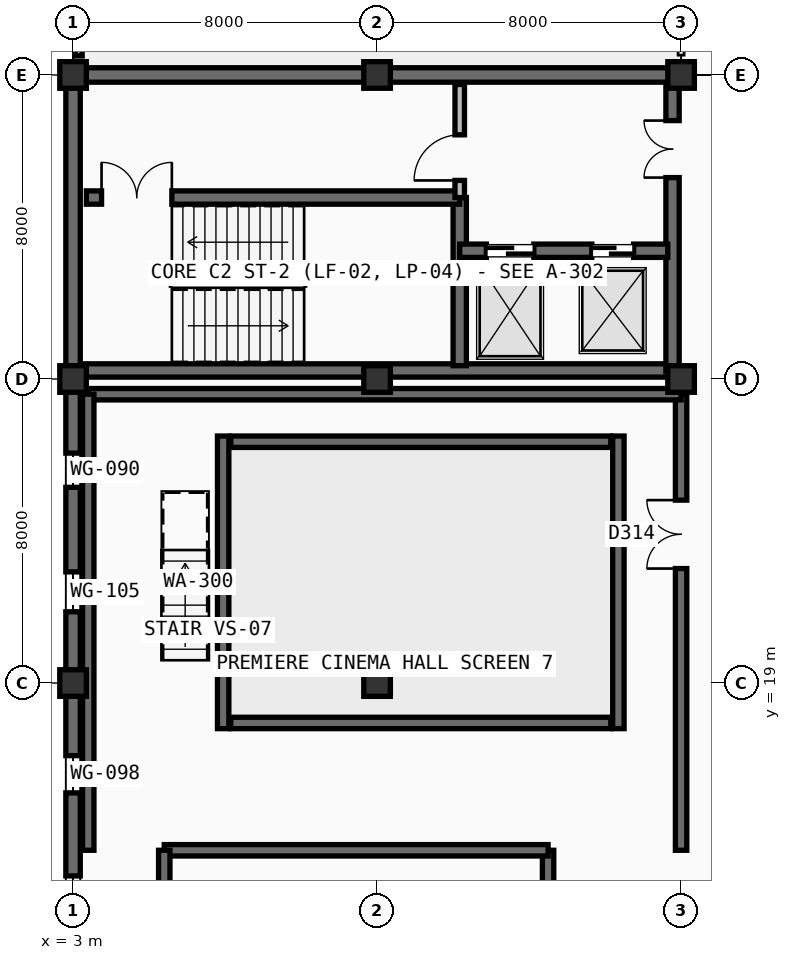
"""IFC4 building model, lengths in metres.
Left out: names, types, materials, properties, quantities, classifications, styles, units other than length and angle.
Written with IfcOpenShell. Run it as: python <this file> out.ifc"""

import sys

from ifc_helpers import new_model, si_unit, direction, frame, frame_2d, origin, origin_2d, place, context, subcontext, project, spatial, polyline, rectangle, outline, extrude, element, fill, save


model = new_model("IFC4")
c1 = context("Model", 3, precision=1e-05, world=origin(), true_north=direction((0.0, 1.0)))
c2 = subcontext(c1, "Body", "Model", "MODEL_VIEW")
j1 = project(units=[si_unit("LENGTHUNIT", "METRE"), si_unit("PLANEANGLEUNIT", "RADIAN")], contexts=[c1])
p1 = place(None, origin())
s1 = spatial("IfcSite", under=j1, at=p1, CompositionType="ELEMENT")
p2 = place(p1, origin())
s2 = spatial("IfcBuilding", under=s1, at=p2, CompositionType="ELEMENT")
p3 = place(p2, frame((0.0, 0.0, 23.4)))
s3 = spatial("IfcBuildingStorey", under=s2, at=p3, CompositionType="ELEMENT", Elevation=23.4)
for number, where, z_axis, x_axis in (
    (1, (3.0, 19.0, 0.0), (0.0, 0.0, 1.0), (1.0, 0.0, 0.0)),
    (2, (3.0, 27.0, 0.0), (0.0, 0.0, 1.0), (1.0, 0.0, 0.0)),
    (3, (3.0, 35.0, 0.0), (0.0, 0.0, 1.0), (1.0, 0.0, 0.0)),
    (4, (11.0, 19.0, 0.0), (0.0, 0.0, 1.0), (1.0, 0.0, 0.0)),
    (5, (11.0, 27.0, 0.0), (0.0, 0.0, 1.0), (1.0, 0.0, 0.0)),
    (6, (11.0, 35.0, 0.0), (0.0, 0.0, 1.0), (1.0, 0.0, 0.0)),
    (7, (19.0, 27.0, 0.0), (0.0, 0.0, 1.0), (1.0, 0.0, 0.0)),
    (8, (19.0, 35.0, 0.0), (0.0, 0.0, 1.0), (1.0, 0.0, 0.0)),
):
    element("IfcColumn", number, at=place(p3, frame(where, z_axis=z_axis, x_axis=x_axis)), inside=s3, PredefinedType="COLUMN", context=c2, shape_type="SweptSolid", body=[
        extrude(rectangle(XDim=0.7, YDim=0.7, at=origin_2d()), origin(), (0.0, 0.0, 1.0), 4.5),
    ])
for number, where, z_axis, x_axis in (
    (9, (6.95, 17.8, 0.0), (0.0, 0.0, 1.0), (0.0, 1.0, 0.0)),
    (10, (17.35, 17.8, 0.0), (0.0, 0.0, 1.0), (0.0, 1.0, 0.0)),
):
    element("IfcWall", number, at=place(p3, frame(where, z_axis=z_axis, x_axis=x_axis)), inside=s3, PredefinedType="SHEAR", context=c2, shape_type="SweptSolid", body=[
        extrude(outline(polyline([(0.0, 0.0), (7.7, 0.0), (7.7, 2.27), (0.0, 0.32), (0.0, 0.0)])), frame((0.0, 0.15, 0.0), z_axis=(0.0, -1.0, 0.0), x_axis=(1.0, 0.0, 0.0)), (0.0, 0.0, 1.0), 0.3),
    ])
p4 = place(p3, frame((7.15, 25.35, 0.0), z_axis=(0.0, 0.0, 1.0), x_axis=(1.0, 0.0, 0.0)))
e11 = element("IfcWall", 11, at=p4, inside=s3, PredefinedType="SHEAR", context=c2, shape_type="SweptSolid", body=[
    extrude(rectangle(XDim=10.0, YDim=0.3, at=frame_2d((5.0, 0.0))), origin(), (0.0, 0.0, 1.0), 2.27),
])
p5 = place(p3, frame((7.15, 17.95, 0.0), z_axis=(0.0, 0.0, 1.0), x_axis=(1.0, 0.0, 0.0)))
e12 = element("IfcWall", 12, at=p5, inside=s3, PredefinedType="SHEAR", context=c2, shape_type="SweptSolid", body=[
    extrude(rectangle(XDim=10.0, YDim=0.3, at=frame_2d((5.0, 0.0))), origin(), (0.0, 0.0, 1.0), 0.32),
])
p6 = place(p3, frame((3.0, 11.0, 0.0), z_axis=(0.0, 0.0, 1.0), x_axis=(0.0, 1.0, 0.0)))
e13 = element("IfcWall", 13, at=p6, inside=s3, PredefinedType="SOLIDWALL", context=c2, shape_type="SweptSolid", body=[
    extrude(rectangle(XDim=8.0, YDim=0.38, at=frame_2d((4.0, 0.0))), origin(), (0.0, 0.0, 1.0), 4.5),
])
p7 = place(p6, frame((1.875, 0.0, 1.05)))
e14 = element("IfcOpeningElement", 14, at=p7, cuts=e13, PredefinedType="OPENING", context=c2, shape_type="SweptSolid", body=[
    extrude(rectangle(XDim=1.05, YDim=1.7, at=frame_2d((0.525, 0.85))), frame((0.0, 0.2, 0.0), z_axis=(0.0, -1.0, 0.0), x_axis=(1.0, 0.0, 0.0)), (0.0, 0.0, 1.0), 0.4),
])
p8 = place(p6, frame((5.11, 0.0, 1.05)))
e15 = element("IfcOpeningElement", 15, at=p8, cuts=e13, PredefinedType="OPENING", context=c2, shape_type="SweptSolid", body=[
    extrude(rectangle(XDim=0.98, YDim=1.6, at=frame_2d((0.49, 0.8))), frame((0.0, 0.2, 0.0), z_axis=(0.0, -1.0, 0.0), x_axis=(1.0, 0.0, 0.0)), (0.0, 0.0, 1.0), 0.4),
])
p9 = place(p3, frame((3.0, 19.0, 0.0), z_axis=(0.0, 0.0, 1.0), x_axis=(0.0, 1.0, 0.0)))
e16 = element("IfcWall", 16, at=p9, inside=s3, PredefinedType="SOLIDWALL", context=c2, shape_type="SweptSolid", body=[
    extrude(rectangle(XDim=8.0, YDim=0.38, at=frame_2d((4.0, 0.0))), origin(), (0.0, 0.0, 1.0), 4.5),
])
p10 = place(p9, frame((1.875, 0.0, 1.05)))
e17 = element("IfcOpeningElement", 17, at=p10, cuts=e16, PredefinedType="OPENING", context=c2, shape_type="SweptSolid", body=[
    extrude(rectangle(XDim=1.05, YDim=1.7, at=frame_2d((0.525, 0.85))), frame((0.0, 0.2, 0.0), z_axis=(0.0, -1.0, 0.0), x_axis=(1.0, 0.0, 0.0)), (0.0, 0.0, 1.0), 0.4),
])
p11 = place(p9, frame((5.15, 0.0, 1.05)))
e18 = element("IfcOpeningElement", 18, at=p11, cuts=e16, PredefinedType="OPENING", context=c2, shape_type="SweptSolid", body=[
    extrude(rectangle(XDim=0.9, YDim=1.5, at=frame_2d((0.45, 0.75))), frame((0.0, 0.2, 0.0), z_axis=(0.0, -1.0, 0.0), x_axis=(1.0, 0.0, 0.0)), (0.0, 0.0, 1.0), 0.4),
])
for number, where, z_axis, x_axis in (
    (19, (3.0, 27.0, 0.0), (0.0, 0.0, 1.0), (0.0, 1.0, 0.0)),
    (20, (3.0, 35.0, 0.0), (0.0, 0.0, 1.0), (1.0, 0.0, 0.0)),
    (21, (11.0, 35.0, 0.0), (0.0, 0.0, 1.0), (1.0, 0.0, 0.0)),
):
    element("IfcWall", number, at=place(p3, frame(where, z_axis=z_axis, x_axis=x_axis)), inside=s3, PredefinedType="SOLIDWALL", context=c2, shape_type="SweptSolid", body=[
        extrude(rectangle(XDim=8.0, YDim=0.38, at=frame_2d((4.0, 0.0))), origin(), (0.0, 0.0, 1.0), 4.5),
    ])
p12 = place(p3, frame((3.15, 35.5, 0.0), z_axis=(0.0, 0.0, 1.0), x_axis=(0.0, 1.0, 0.0)))
e22 = element("IfcWall", 22, at=p12, inside=s3, PredefinedType="PARAPET", context=c2, shape_type="SweptSolid", body=[
    extrude(rectangle(XDim=36.35, YDim=0.18, at=frame_2d((18.175, 0.0))), origin(), (0.0, 0.0, 1.0), 1.15),
])
p13 = place(p3, frame((3.2, 27.225, 0.0), z_axis=(0.0, 0.0, 1.0), x_axis=(1.0, 0.0, 0.0)))
e23 = element("IfcWall", 23, at=p13, inside=s3, PredefinedType="SHEAR", context=c2, shape_type="SweptSolid", body=[
    extrude(rectangle(XDim=15.6, YDim=0.35, at=frame_2d((7.8, 0.0))), origin(), (0.0, 0.0, 1.0), 4.1),
])
p14 = place(p3, frame((13.175, 27.35, 0.0), z_axis=(0.0, 0.0, 1.0), x_axis=(0.0, 1.0, 0.0)))
e24 = element("IfcWall", 24, at=p14, inside=s3, PredefinedType="SHEAR", context=c2, shape_type="SweptSolid", body=[
    extrude(rectangle(XDim=4.425, YDim=0.35, at=frame_2d((2.212, 0.0))), origin(), (0.0, 0.0, 1.0), 4.1),
])
p15 = place(p3, frame((18.775, 27.2, 0.0), z_axis=(0.0, 0.0, 1.0), x_axis=(0.0, 1.0, 0.0)))
e25 = element("IfcWall", 25, at=p15, inside=s3, PredefinedType="SHEAR", context=c2, shape_type="SweptSolid", body=[
    extrude(rectangle(XDim=7.6, YDim=0.35, at=frame_2d((3.8, 0.0))), origin(), (0.0, 0.0, 1.0), 4.1),
])
p16 = place(p15, frame((5.1, 0.0, 0.0)))
e26 = element("IfcOpeningElement", 26, at=p16, cuts=e25, PredefinedType="OPENING", context=c2, shape_type="SweptSolid", body=[
    extrude(rectangle(XDim=1.5, YDim=2.2, at=frame_2d((0.75, 1.1))), frame((0.0, 0.185, 0.0), z_axis=(0.0, -1.0, 0.0), x_axis=(1.0, 0.0, 0.0)), (0.0, 0.0, 1.0), 0.37),
])
p17 = place(p3, frame((3.35, 31.775, 0.0), z_axis=(0.0, 0.0, 1.0), x_axis=(1.0, 0.0, 0.0)))
e27 = element("IfcWall", 27, at=p17, inside=s3, PredefinedType="SHEAR", context=c2, shape_type="SweptSolid", body=[
    extrude(rectangle(XDim=9.825, YDim=0.35, at=frame_2d((4.913, 0.0))), origin(), (0.0, 0.0, 1.0), 4.1),
])
p18 = place(p17, frame((0.4, 0.0, 0.0)))
e28 = element("IfcOpeningElement", 28, at=p18, cuts=e27, PredefinedType="OPENING", context=c2, shape_type="SweptSolid", body=[
    extrude(rectangle(XDim=1.85, YDim=2.25, at=frame_2d((0.925, 1.125))), frame((0.0, 0.185, 0.0), z_axis=(0.0, -1.0, 0.0), x_axis=(1.0, 0.0, 0.0)), (0.0, 0.0, 1.0), 0.37),
])
p19 = place(p3, frame((13.175, 30.375, 0.0), z_axis=(0.0, 0.0, 1.0), x_axis=(1.0, 0.0, 0.0)))
e29 = element("IfcWall", 29, at=p19, inside=s3, PredefinedType="SHEAR", context=c2, shape_type="SweptSolid", body=[
    extrude(rectangle(XDim=5.475, YDim=0.35, at=frame_2d((2.737, 0.0))), origin(), (0.0, 0.0, 1.0), 4.1),
])
p20 = place(p19, frame((0.7, 0.0, 0.0)))
e30 = element("IfcOpeningElement", 30, at=p20, cuts=e29, PredefinedType="OPENING", context=c2, shape_type="SweptSolid", body=[
    extrude(rectangle(XDim=1.25, YDim=2.25, at=frame_2d((0.625, 1.125))), frame((0.0, 0.185, 0.0), z_axis=(0.0, -1.0, 0.0), x_axis=(1.0, 0.0, 0.0)), (0.0, 0.0, 1.0), 0.37),
])
p21 = place(p19, frame((3.475, 0.0, 0.0)))
e31 = element("IfcOpeningElement", 31, at=p21, cuts=e29, PredefinedType="OPENING", context=c2, shape_type="SweptSolid", body=[
    extrude(rectangle(XDim=1.1, YDim=2.2, at=frame_2d((0.55, 1.1))), frame((0.0, 0.185, 0.0), z_axis=(0.0, -1.0, 0.0), x_axis=(1.0, 0.0, 0.0)), (0.0, 0.0, 1.0), 0.37),
])
p22 = place(p3, frame((13.175, 31.775, 0.0), z_axis=(0.0, 0.0, 1.0), x_axis=(0.0, 1.0, 0.0)))
e32 = element("IfcWall", 32, at=p22, inside=s3, PredefinedType="PARTITIONING", context=c2, shape_type="SweptSolid", body=[
    extrude(rectangle(XDim=2.975, YDim=0.25, at=frame_2d((1.488, 0.0))), origin(), (0.0, 0.0, 1.0), 4.1),
])
p23 = place(p22, frame((0.45, 0.0, 0.0)))
e33 = element("IfcOpeningElement", 33, at=p23, cuts=e32, PredefinedType="OPENING", context=c2, shape_type="SweptSolid", body=[
    extrude(rectangle(XDim=1.2, YDim=2.2, at=frame_2d((0.6, 1.1))), frame((0.0, 0.135, 0.0), z_axis=(0.0, -1.0, 0.0), x_axis=(1.0, 0.0, 0.0)), (0.0, 0.0, 1.0), 0.27),
])
p24 = place(p3, frame((15.5, 3.4, 0.0), z_axis=(0.0, 0.0, 1.0), x_axis=(0.0, 1.0, 0.0)))
e34 = element("IfcWall", 34, at=p24, inside=s3, PredefinedType="SHEAR", context=c2, shape_type="SweptSolid", body=[
    extrude(rectangle(XDim=11.2, YDim=0.3, at=frame_2d((5.6, 0.0))), origin(), (0.0, 0.0, 1.0), 4.1),
])
p25 = place(p24, frame((2.814, 0.0, 0.0)))
e35 = element("IfcOpeningElement", 35, at=p25, cuts=e34, PredefinedType="OPENING", context=c2, shape_type="SweptSolid", body=[
    extrude(rectangle(XDim=1.5, YDim=2.2, at=frame_2d((0.75, 1.1))), frame((0.0, 0.16, 0.0), z_axis=(0.0, -1.0, 0.0), x_axis=(1.0, 0.0, 0.0)), (0.0, 0.0, 1.0), 0.32),
])
p26 = place(p3, frame((5.4, 14.6, 0.0), z_axis=(0.0, 0.0, 1.0), x_axis=(1.0, 0.0, 0.0)))
e36 = element("IfcWall", 36, at=p26, inside=s3, PredefinedType="SHEAR", context=c2, shape_type="SweptSolid", body=[
    extrude(rectangle(XDim=10.1, YDim=0.3, at=frame_2d((5.05, 0.0))), origin(), (0.0, 0.0, 1.0), 4.1),
])
p27 = place(p3, frame((5.4, 3.4, 0.0), z_axis=(0.0, 0.0, 1.0), x_axis=(0.0, 1.0, 0.0)))
e37 = element("IfcWall", 37, at=p27, inside=s3, PredefinedType="SHEAR", context=c2, shape_type="SweptSolid", body=[
    extrude(rectangle(XDim=11.2, YDim=0.3, at=frame_2d((5.6, 0.0))), origin(), (0.0, 0.0, 1.0), 4.1),
])
p28 = place(p3, frame((19.0, 14.6, 0.0), z_axis=(0.0, 0.0, 1.0), x_axis=(0.0, 1.0, 0.0)))
e38 = element("IfcWall", 38, at=p28, inside=s3, PredefinedType="SHEAR", context=c2, shape_type="SweptSolid", body=[
    extrude(rectangle(XDim=12.0, YDim=0.3, at=frame_2d((6.0, 0.0))), origin(), (0.0, 0.0, 1.0), 4.1),
])
p29 = place(p28, frame((7.413, 0.0, 0.0)))
e39 = element("IfcOpeningElement", 39, at=p29, cuts=e38, PredefinedType="OPENING", context=c2, shape_type="SweptSolid", body=[
    extrude(rectangle(XDim=1.8, YDim=2.3, at=frame_2d((0.9, 1.15))), frame((0.0, 0.16, 0.0), z_axis=(0.0, -1.0, 0.0), x_axis=(1.0, 0.0, 0.0)), (0.0, 0.0, 1.0), 0.32),
])
p30 = place(p3, frame((3.4, 26.6, 0.0), z_axis=(0.0, 0.0, 1.0), x_axis=(1.0, 0.0, 0.0)))
e40 = element("IfcWall", 40, at=p30, inside=s3, PredefinedType="SHEAR", context=c2, shape_type="SweptSolid", body=[
    extrude(rectangle(XDim=15.6, YDim=0.3, at=frame_2d((7.8, 0.0))), origin(), (0.0, 0.0, 1.0), 4.1),
])
p31 = place(p3, frame((3.4, 14.6, 0.0), z_axis=(0.0, 0.0, 1.0), x_axis=(0.0, 1.0, 0.0)))
e41 = element("IfcWall", 41, at=p31, inside=s3, PredefinedType="SHEAR", context=c2, shape_type="SweptSolid", body=[
    extrude(rectangle(XDim=12.0, YDim=0.3, at=frame_2d((6.0, 0.0))), origin(), (0.0, 0.0, 1.0), 4.1),
])
p32 = place(p7, origin())
e42 = element("IfcWindow", 42, at=p32, inside=s3, PartitioningType="SINGLE_PANEL", PredefinedType="WINDOW", context=c2, shape_type="SweptSolid", body=[
    extrude(rectangle(XDim=1.05, YDim=1.7, at=frame_2d((0.525, 0.85))), frame((0.0, 0.03, 0.0), z_axis=(0.0, -1.0, 0.0), x_axis=(1.0, 0.0, 0.0)), (0.0, 0.0, 1.0), 0.06),
])
fill(e14, e42)
p33 = place(p8, origin())
e43 = element("IfcWindow", 43, at=p33, inside=s3, PartitioningType="SINGLE_PANEL", PredefinedType="WINDOW", context=c2, shape_type="SweptSolid", body=[
    extrude(rectangle(XDim=0.98, YDim=1.6, at=frame_2d((0.49, 0.8))), frame((0.0, 0.03, 0.0), z_axis=(0.0, -1.0, 0.0), x_axis=(1.0, 0.0, 0.0)), (0.0, 0.0, 1.0), 0.06),
])
fill(e15, e43)
p34 = place(p10, origin())
e44 = element("IfcWindow", 44, at=p34, inside=s3, PartitioningType="SINGLE_PANEL", PredefinedType="WINDOW", context=c2, shape_type="SweptSolid", body=[
    extrude(rectangle(XDim=1.05, YDim=1.7, at=frame_2d((0.525, 0.85))), frame((0.0, 0.03, 0.0), z_axis=(0.0, -1.0, 0.0), x_axis=(1.0, 0.0, 0.0)), (0.0, 0.0, 1.0), 0.06),
])
fill(e17, e44)
p35 = place(p11, origin())
e45 = element("IfcWindow", 45, at=p35, inside=s3, PartitioningType="SINGLE_PANEL", PredefinedType="WINDOW", context=c2, shape_type="SweptSolid", body=[
    extrude(rectangle(XDim=0.9, YDim=1.5, at=frame_2d((0.45, 0.75))), frame((0.0, 0.03, 0.0), z_axis=(0.0, -1.0, 0.0), x_axis=(1.0, 0.0, 0.0)), (0.0, 0.0, 1.0), 0.06),
])
fill(e18, e45)
p36 = place(p18, origin())
e46 = element("IfcDoor", 46, at=p36, inside=s3, OperationType="DOUBLE_DOOR_SINGLE_SWING", PredefinedType="DOOR", context=c2, shape_type="SweptSolid", body=[
    extrude(rectangle(XDim=1.85, YDim=2.25, at=frame_2d((0.925, 1.125))), frame((0.0, 0.025, 0.0), z_axis=(0.0, -1.0, 0.0), x_axis=(1.0, 0.0, 0.0)), (0.0, 0.0, 1.0), 0.05),
])
fill(e28, e46)
p37 = place(p20, origin())
e47 = element("IfcDoor", 47, at=p37, inside=s3, OperationType="DOUBLE_DOOR_SLIDING", PredefinedType="DOOR", context=c2, shape_type="SweptSolid", body=[
    extrude(rectangle(XDim=1.25, YDim=2.25, at=frame_2d((0.625, 1.125))), frame((0.0, 0.025, 0.0), z_axis=(0.0, -1.0, 0.0), x_axis=(1.0, 0.0, 0.0)), (0.0, 0.0, 1.0), 0.05),
])
fill(e30, e47)
p38 = place(p21, origin())
e48 = element("IfcDoor", 48, at=p38, inside=s3, OperationType="DOUBLE_DOOR_SLIDING", PredefinedType="DOOR", context=c2, shape_type="SweptSolid", body=[
    extrude(rectangle(XDim=1.1, YDim=2.2, at=frame_2d((0.55, 1.1))), frame((0.0, 0.025, 0.0), z_axis=(0.0, -1.0, 0.0), x_axis=(1.0, 0.0, 0.0)), (0.0, 0.0, 1.0), 0.05),
])
fill(e31, e48)
p39 = place(p23, origin())
e49 = element("IfcDoor", 49, at=p39, inside=s3, OperationType="SINGLE_SWING_LEFT", PredefinedType="DOOR", context=c2, shape_type="SweptSolid", body=[
    extrude(rectangle(XDim=1.2, YDim=2.2, at=frame_2d((0.6, 1.1))), frame((0.0, 0.025, 0.0), z_axis=(0.0, -1.0, 0.0), x_axis=(1.0, 0.0, 0.0)), (0.0, 0.0, 1.0), 0.05),
])
fill(e33, e49)
p40 = place(p16, origin())
e50 = element("IfcDoor", 50, at=p40, inside=s3, OperationType="DOUBLE_DOOR_SINGLE_SWING", PredefinedType="DOOR", context=c2, shape_type="SweptSolid", body=[
    extrude(rectangle(XDim=1.5, YDim=2.2, at=frame_2d((0.75, 1.1))), frame((0.0, 0.025, 0.0), z_axis=(0.0, -1.0, 0.0), x_axis=(1.0, 0.0, 0.0)), (0.0, 0.0, 1.0), 0.05),
])
fill(e26, e50)
p41 = place(p29, origin())
e51 = element("IfcDoor", 51, at=p41, inside=s3, OperationType="DOUBLE_DOOR_SINGLE_SWING", PredefinedType="DOOR", context=c2, shape_type="SweptSolid", body=[
    extrude(rectangle(XDim=1.8, YDim=2.3, at=frame_2d((0.9, 1.15))), frame((0.0, 0.025, 0.0), z_axis=(0.0, -1.0, 0.0), x_axis=(1.0, 0.0, 0.0)), (0.0, 0.0, 1.0), 0.05),
])
fill(e39, e51)
save(model, sys.argv[1])
